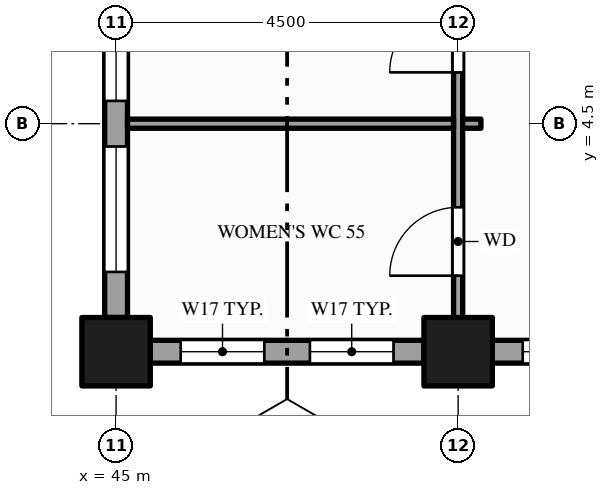
"""IFC4 building model, lengths in metres.
Left out: names, types, materials, properties, quantities, classifications, styles, units other than length and angle.
Written with IfcOpenShell. Run it as: python <this file> out.ifc"""

import sys

from ifc_helpers import new_model, si_unit, direction, frame, frame_2d, origin, origin_2d, place, context, subcontext, project, spatial, rectangle, hollow_rectangle, extrude, element, fill, save


model = new_model("IFC4")
c1 = context("Model", 3, precision=1e-05, world=origin(), true_north=direction((0.0, 1.0)))
c2 = subcontext(c1, "Body", "Model", "MODEL_VIEW")
j1 = project(units=[si_unit("LENGTHUNIT", "METRE"), si_unit("PLANEANGLEUNIT", "RADIAN")], contexts=[c1])
p1 = place(None, origin())
s1 = spatial("IfcSite", under=j1, at=p1, CompositionType="ELEMENT")
p2 = place(p1, origin())
s2 = spatial("IfcBuilding", under=s1, at=p2, CompositionType="ELEMENT")
p3 = place(p2, frame((0.0, 0.0, 143.0)))
s3 = spatial("IfcBuildingStorey", under=s2, at=p3, CompositionType="ELEMENT", Elevation=143.0)
for number, where, z_axis, x_axis in (
    (1, (45.0, 1.5, -0.15), (0.0, 0.0, 1.0), (1.0, 0.0, 0.0)),
    (2, (49.5, 1.5, -0.15), (0.0, 0.0, 1.0), (1.0, 0.0, 0.0)),
):
    element("IfcColumn", number, at=place(p3, frame(where, z_axis=z_axis, x_axis=x_axis)), inside=s3, PredefinedType="COLUMN", context=c2, shape_type="SweptSolid", body=[
        extrude(hollow_rectangle(XDim=0.9, YDim=0.9, WallThickness=0.045, at=origin_2d()), origin(), (0.0, 0.0, 1.0), 4.0),
    ])
p4 = place(p3, frame((45.45, 1.5, 0.0), z_axis=(0.0, 0.0, 1.0), x_axis=(1.0, 0.0, 0.0)))
e3 = element("IfcWall", 3, at=p4, inside=s3, PredefinedType="STANDARD", context=c2, shape_type="SweptSolid", body=[
    extrude(rectangle(XDim=3.6, YDim=0.3, at=frame_2d((1.8, 0.0))), origin(), (0.0, 0.0, 1.0), 2.87),
])
p5 = place(p4, frame((0.4, 0.0, 0.9)))
e4 = element("IfcOpeningElement", 4, at=p5, cuts=e3, PredefinedType="OPENING", context=c2, shape_type="SweptSolid", body=[
    extrude(rectangle(XDim=1.1, YDim=1.75, at=frame_2d((0.55, 0.875))), frame((0.0, 0.16, 0.0), z_axis=(0.0, -1.0, 0.0), x_axis=(1.0, 0.0, 0.0)), (0.0, 0.0, 1.0), 0.32),
])
p6 = place(p4, frame((2.1, 0.0, 0.9)))
e5 = element("IfcOpeningElement", 5, at=p6, cuts=e3, PredefinedType="OPENING", context=c2, shape_type="SweptSolid", body=[
    extrude(rectangle(XDim=1.1, YDim=1.75, at=frame_2d((0.55, 0.875))), frame((0.0, 0.16, 0.0), z_axis=(0.0, -1.0, 0.0), x_axis=(1.0, 0.0, 0.0)), (0.0, 0.0, 1.0), 0.32),
])
p7 = place(p3, frame((49.95, 1.5, 0.0), z_axis=(0.0, 0.0, 1.0), x_axis=(1.0, 0.0, 0.0)))
e6 = element("IfcWall", 6, at=p7, inside=s3, PredefinedType="STANDARD", context=c2, shape_type="SweptSolid", body=[
    extrude(rectangle(XDim=4.05, YDim=0.3, at=frame_2d((2.025, 0.0))), origin(), (0.0, 0.0, 1.0), 2.87),
])
p8 = place(p7, frame((0.4, 0.0, 0.9)))
e7 = element("IfcOpeningElement", 7, at=p8, cuts=e6, PredefinedType="OPENING", context=c2, shape_type="SweptSolid", body=[
    extrude(rectangle(XDim=1.1, YDim=1.75, at=frame_2d((0.55, 0.875))), frame((0.0, 0.16, 0.0), z_axis=(0.0, -1.0, 0.0), x_axis=(1.0, 0.0, 0.0)), (0.0, 0.0, 1.0), 0.32),
])
p9 = place(p7, frame((2.1, 0.0, 0.9)))
e8 = element("IfcOpeningElement", 8, at=p9, cuts=e6, PredefinedType="OPENING", context=c2, shape_type="SweptSolid", body=[
    extrude(rectangle(XDim=1.55, YDim=1.75, at=frame_2d((0.775, 0.875))), frame((0.0, 0.16, 0.0), z_axis=(0.0, -1.0, 0.0), x_axis=(1.0, 0.0, 0.0)), (0.0, 0.0, 1.0), 0.32),
])
p10 = place(p3, frame((45.0, 23.55, 0.0), z_axis=(0.0, 0.0, 1.0), x_axis=(0.0, -1.0, 0.0)))
e9 = element("IfcWall", 9, at=p10, inside=s3, PredefinedType="STANDARD", context=c2, shape_type="SweptSolid", body=[
    extrude(rectangle(XDim=21.6, YDim=0.3, at=frame_2d((10.8, 0.0))), origin(), (0.0, 0.0, 1.0), 3.149),
])
p11 = place(p10, frame((1.35, 0.0, 0.9)))
e10 = element("IfcOpeningElement", 10, at=p11, cuts=e9, PredefinedType="OPENING", context=c2, shape_type="SweptSolid", body=[
    extrude(rectangle(XDim=1.65, YDim=2.0, at=frame_2d((0.825, 1.0))), frame((0.0, 0.16, 0.0), z_axis=(0.0, -1.0, 0.0), x_axis=(1.0, 0.0, 0.0)), (0.0, 0.0, 1.0), 0.32),
])
p12 = place(p10, frame((3.6, 0.0, 0.9)))
e11 = element("IfcOpeningElement", 11, at=p12, cuts=e9, PredefinedType="OPENING", context=c2, shape_type="SweptSolid", body=[
    extrude(rectangle(XDim=1.65, YDim=2.0, at=frame_2d((0.825, 1.0))), frame((0.0, 0.16, 0.0), z_axis=(0.0, -1.0, 0.0), x_axis=(1.0, 0.0, 0.0)), (0.0, 0.0, 1.0), 0.32),
])
p13 = place(p10, frame((5.85, 0.0, 0.9)))
e12 = element("IfcOpeningElement", 12, at=p13, cuts=e9, PredefinedType="OPENING", context=c2, shape_type="SweptSolid", body=[
    extrude(rectangle(XDim=1.65, YDim=2.0, at=frame_2d((0.825, 1.0))), frame((0.0, 0.16, 0.0), z_axis=(0.0, -1.0, 0.0), x_axis=(1.0, 0.0, 0.0)), (0.0, 0.0, 1.0), 0.32),
])
p14 = place(p10, frame((8.1, 0.0, 0.9)))
e13 = element("IfcOpeningElement", 13, at=p14, cuts=e9, PredefinedType="OPENING", context=c2, shape_type="SweptSolid", body=[
    extrude(rectangle(XDim=1.65, YDim=2.0, at=frame_2d((0.825, 1.0))), frame((0.0, 0.16, 0.0), z_axis=(0.0, -1.0, 0.0), x_axis=(1.0, 0.0, 0.0)), (0.0, 0.0, 1.0), 0.32),
])
p15 = place(p10, frame((10.35, 0.0, 0.9)))
e14 = element("IfcOpeningElement", 14, at=p15, cuts=e9, PredefinedType="OPENING", context=c2, shape_type="SweptSolid", body=[
    extrude(rectangle(XDim=1.65, YDim=2.0, at=frame_2d((0.825, 1.0))), frame((0.0, 0.16, 0.0), z_axis=(0.0, -1.0, 0.0), x_axis=(1.0, 0.0, 0.0)), (0.0, 0.0, 1.0), 0.32),
])
p16 = place(p10, frame((12.6, 0.0, 0.9)))
e15 = element("IfcOpeningElement", 15, at=p16, cuts=e9, PredefinedType="OPENING", context=c2, shape_type="SweptSolid", body=[
    extrude(rectangle(XDim=1.65, YDim=2.0, at=frame_2d((0.825, 1.0))), frame((0.0, 0.16, 0.0), z_axis=(0.0, -1.0, 0.0), x_axis=(1.0, 0.0, 0.0)), (0.0, 0.0, 1.0), 0.32),
])
p17 = place(p10, frame((14.85, 0.0, 0.9)))
e16 = element("IfcOpeningElement", 16, at=p17, cuts=e9, PredefinedType="OPENING", context=c2, shape_type="SweptSolid", body=[
    extrude(rectangle(XDim=1.65, YDim=2.0, at=frame_2d((0.825, 1.0))), frame((0.0, 0.16, 0.0), z_axis=(0.0, -1.0, 0.0), x_axis=(1.0, 0.0, 0.0)), (0.0, 0.0, 1.0), 0.32),
])
p18 = place(p10, frame((17.1, 0.0, 0.9)))
e17 = element("IfcOpeningElement", 17, at=p18, cuts=e9, PredefinedType="OPENING", context=c2, shape_type="SweptSolid", body=[
    extrude(rectangle(XDim=1.65, YDim=2.0, at=frame_2d((0.825, 1.0))), frame((0.0, 0.16, 0.0), z_axis=(0.0, -1.0, 0.0), x_axis=(1.0, 0.0, 0.0)), (0.0, 0.0, 1.0), 0.32),
])
p19 = place(p10, frame((19.35, 0.0, 0.9)))
e18 = element("IfcOpeningElement", 18, at=p19, cuts=e9, PredefinedType="OPENING", context=c2, shape_type="SweptSolid", body=[
    extrude(rectangle(XDim=1.65, YDim=2.0, at=frame_2d((0.825, 1.0))), frame((0.0, 0.16, 0.0), z_axis=(0.0, -1.0, 0.0), x_axis=(1.0, 0.0, 0.0)), (0.0, 0.0, 1.0), 0.32),
])
p20 = place(p3, frame((49.5, 1.65, 0.0), z_axis=(0.0, 0.0, 1.0), x_axis=(0.0, 1.0, 0.0)))
e19 = element("IfcWall", 19, at=p20, inside=s3, PredefinedType="PARTITIONING", context=c2, shape_type="SweptSolid", body=[
    extrude(rectangle(XDim=22.2, YDim=0.12, at=frame_2d((11.1, 0.0))), origin(), (0.0, 0.0, 1.0), 2.87),
])
p21 = place(p20, frame((0.85, 0.0, 0.0)))
e20 = element("IfcOpeningElement", 20, at=p21, cuts=e19, PredefinedType="OPENING", context=c2, shape_type="SweptSolid", body=[
    extrude(rectangle(XDim=0.9, YDim=2.1, at=frame_2d((0.45, 1.05))), frame((0.0, 0.07, 0.0), z_axis=(0.0, -1.0, 0.0), x_axis=(1.0, 0.0, 0.0)), (0.0, 0.0, 1.0), 0.14),
])
p22 = place(p20, frame((3.525, 0.0, 0.0)))
e21 = element("IfcOpeningElement", 21, at=p22, cuts=e19, PredefinedType="OPENING", context=c2, shape_type="SweptSolid", body=[
    extrude(rectangle(XDim=0.9, YDim=2.1, at=frame_2d((0.45, 1.05))), frame((0.0, 0.07, 0.0), z_axis=(0.0, -1.0, 0.0), x_axis=(1.0, 0.0, 0.0)), (0.0, 0.0, 1.0), 0.14),
])
p23 = place(p20, frame((5.35, 0.0, 0.0)))
e22 = element("IfcOpeningElement", 22, at=p23, cuts=e19, PredefinedType="OPENING", context=c2, shape_type="SweptSolid", body=[
    extrude(rectangle(XDim=1.0, YDim=2.1, at=frame_2d((0.5, 1.05))), frame((0.0, 0.07, 0.0), z_axis=(0.0, -1.0, 0.0), x_axis=(1.0, 0.0, 0.0)), (0.0, 0.0, 1.0), 0.14),
])
p24 = place(p20, frame((10.225, 0.0, 0.0)))
e23 = element("IfcOpeningElement", 23, at=p24, cuts=e19, PredefinedType="OPENING", context=c2, shape_type="SweptSolid", body=[
    extrude(rectangle(XDim=1.0, YDim=2.1, at=frame_2d((0.5, 1.05))), frame((0.0, 0.07, 0.0), z_axis=(0.0, -1.0, 0.0), x_axis=(1.0, 0.0, 0.0)), (0.0, 0.0, 1.0), 0.14),
])
p25 = place(p20, frame((15.85, 0.0, 0.0)))
e24 = element("IfcOpeningElement", 24, at=p25, cuts=e19, PredefinedType="OPENING", context=c2, shape_type="SweptSolid", body=[
    extrude(rectangle(XDim=1.0, YDim=2.1, at=frame_2d((0.5, 1.05))), frame((0.0, 0.07, 0.0), z_axis=(0.0, -1.0, 0.0), x_axis=(1.0, 0.0, 0.0)), (0.0, 0.0, 1.0), 0.14),
])
p26 = place(p20, frame((19.92, 0.0, 0.0)))
e25 = element("IfcOpeningElement", 25, at=p26, cuts=e19, PredefinedType="OPENING", context=c2, shape_type="SweptSolid", body=[
    extrude(rectangle(XDim=1.0, YDim=2.1, at=frame_2d((0.5, 1.05))), frame((0.0, 0.07, 0.0), z_axis=(0.0, -1.0, 0.0), x_axis=(1.0, 0.0, 0.0)), (0.0, 0.0, 1.0), 0.14),
])
p27 = place(p3, frame((45.15, 4.5, 0.0), z_axis=(0.0, 0.0, 1.0), x_axis=(1.0, 0.0, 0.0)))
e26 = element("IfcWall", 26, at=p27, inside=s3, PredefinedType="PARTITIONING", context=c2, shape_type="SweptSolid", body=[
    extrude(rectangle(XDim=4.29, YDim=0.12, at=frame_2d((2.145, 0.0))), origin(), (0.0, 0.0, 1.0), 2.87),
])
p28 = place(p3, frame((49.56, 4.5, 0.0), z_axis=(0.0, 0.0, 1.0), x_axis=(1.0, 0.0, 0.0)))
e27 = element("IfcWall", 27, at=p28, inside=s3, PredefinedType="PARTITIONING", context=c2, shape_type="SweptSolid", body=[
    extrude(rectangle(XDim=0.24, YDim=0.12, at=frame_2d((0.12, 0.0))), origin(), (0.0, 0.0, 1.0), 2.87),
])
p29 = place(p5, origin())
e28 = element("IfcWindow", 28, at=p29, inside=s3, PartitioningType="SINGLE_PANEL", PredefinedType="WINDOW", context=c2, shape_type="SweptSolid", body=[
    extrude(rectangle(XDim=1.1, YDim=1.75, at=frame_2d((0.55, 0.875))), frame((0.0, 0.03, 0.0), z_axis=(0.0, -1.0, 0.0), x_axis=(1.0, 0.0, 0.0)), (0.0, 0.0, 1.0), 0.06),
])
fill(e4, e28)
p30 = place(p6, origin())
e29 = element("IfcWindow", 29, at=p30, inside=s3, PartitioningType="SINGLE_PANEL", PredefinedType="WINDOW", context=c2, shape_type="SweptSolid", body=[
    extrude(rectangle(XDim=1.1, YDim=1.75, at=frame_2d((0.55, 0.875))), frame((0.0, 0.03, 0.0), z_axis=(0.0, -1.0, 0.0), x_axis=(1.0, 0.0, 0.0)), (0.0, 0.0, 1.0), 0.06),
])
fill(e5, e29)
p31 = place(p8, origin())
e30 = element("IfcWindow", 30, at=p31, inside=s3, PartitioningType="SINGLE_PANEL", PredefinedType="WINDOW", context=c2, shape_type="SweptSolid", body=[
    extrude(rectangle(XDim=1.1, YDim=1.75, at=frame_2d((0.55, 0.875))), frame((0.0, 0.03, 0.0), z_axis=(0.0, -1.0, 0.0), x_axis=(1.0, 0.0, 0.0)), (0.0, 0.0, 1.0), 0.06),
])
fill(e7, e30)
p32 = place(p18, origin())
e31 = element("IfcWindow", 31, at=p32, inside=s3, PartitioningType="SINGLE_PANEL", PredefinedType="WINDOW", context=c2, shape_type="SweptSolid", body=[
    extrude(rectangle(XDim=1.65, YDim=2.0, at=frame_2d((0.825, 1.0))), frame((0.0, 0.03, 0.0), z_axis=(0.0, -1.0, 0.0), x_axis=(1.0, 0.0, 0.0)), (0.0, 0.0, 1.0), 0.06),
])
fill(e17, e31)
p33 = place(p19, origin())
e32 = element("IfcWindow", 32, at=p33, inside=s3, PartitioningType="SINGLE_PANEL", PredefinedType="WINDOW", context=c2, shape_type="SweptSolid", body=[
    extrude(rectangle(XDim=1.65, YDim=2.0, at=frame_2d((0.825, 1.0))), frame((0.0, 0.03, 0.0), z_axis=(0.0, -1.0, 0.0), x_axis=(1.0, 0.0, 0.0)), (0.0, 0.0, 1.0), 0.06),
])
fill(e18, e32)
p34 = place(p21, origin())
e33 = element("IfcDoor", 33, at=p34, inside=s3, OperationType="SINGLE_SWING_LEFT", PredefinedType="DOOR", context=c2, shape_type="SweptSolid", body=[
    extrude(rectangle(XDim=0.9, YDim=2.1, at=frame_2d((0.45, 1.05))), frame((0.0, 0.025, 0.0), z_axis=(0.0, -1.0, 0.0), x_axis=(1.0, 0.0, 0.0)), (0.0, 0.0, 1.0), 0.05),
])
fill(e20, e33)
p35 = place(p22, origin())
e34 = element("IfcDoor", 34, at=p35, inside=s3, OperationType="SINGLE_SWING_LEFT", PredefinedType="DOOR", context=c2, shape_type="SweptSolid", body=[
    extrude(rectangle(XDim=0.9, YDim=2.1, at=frame_2d((0.45, 1.05))), frame((0.0, 0.025, 0.0), z_axis=(0.0, -1.0, 0.0), x_axis=(1.0, 0.0, 0.0)), (0.0, 0.0, 1.0), 0.05),
])
fill(e21, e34)
save(model, sys.argv[1])
